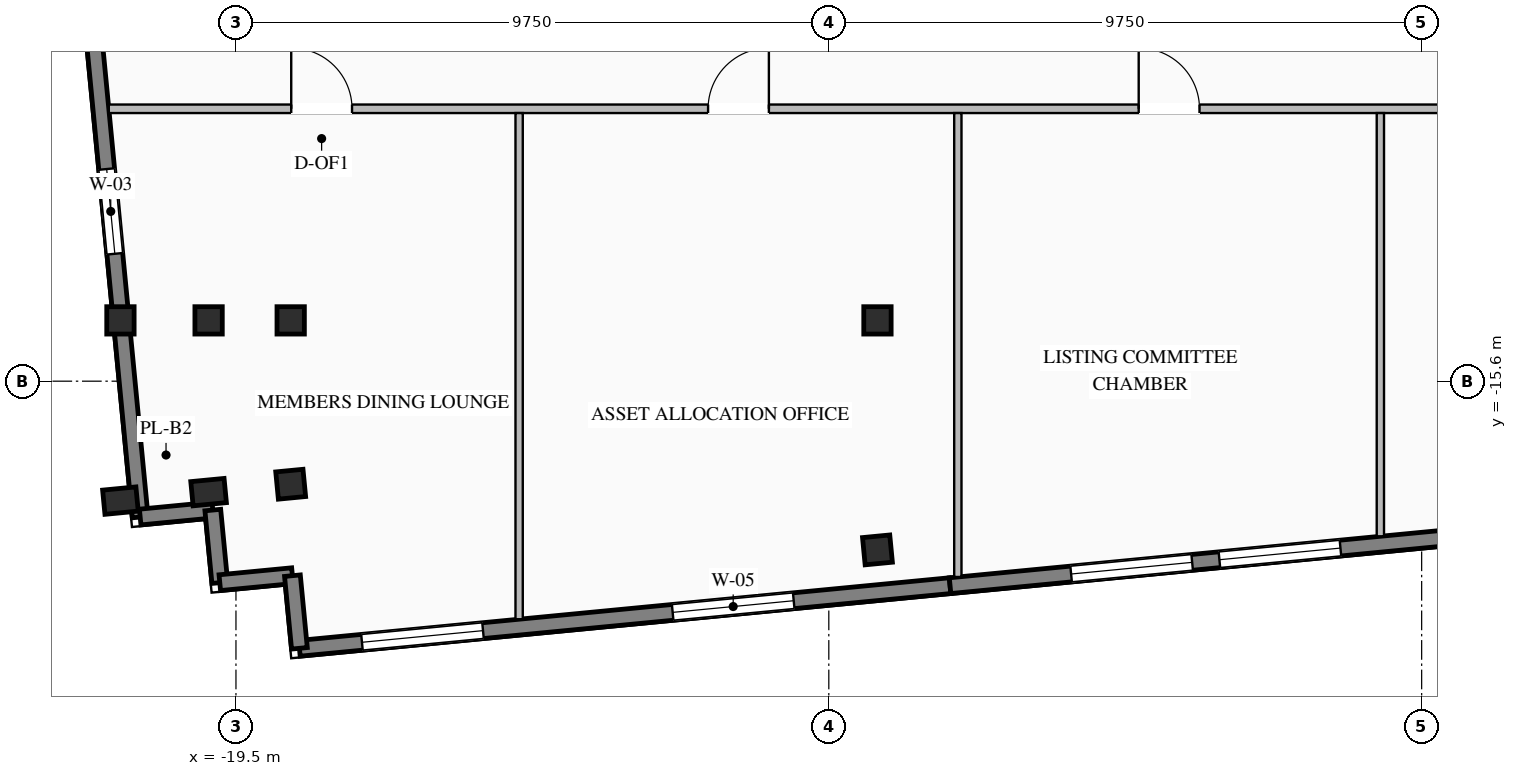
"""IFC4 building model, lengths in metres.
Left out: names, types, materials, properties, quantities, classifications, styles, units other than length and angle.
Written with IfcOpenShell. Run it as: python <this file> out.ifc"""

import sys

from ifc_helpers import new_model, si_unit, direction, frame, frame_2d, origin, origin_2d, place, context, subcontext, project, spatial, rectangle, i_section, extrude, element, fill, save


model = new_model("IFC4")
c1 = context("Model", 3, precision=1e-05, world=origin(), true_north=direction((0.0, 1.0)))
c2 = subcontext(c1, "Body", "Model", "MODEL_VIEW")
j1 = project(units=[si_unit("LENGTHUNIT", "METRE"), si_unit("PLANEANGLEUNIT", "RADIAN")], contexts=[c1])
p1 = place(None, origin())
s1 = spatial("IfcSite", under=j1, at=p1, CompositionType="ELEMENT")
p2 = place(p1, origin())
s2 = spatial("IfcBuilding", under=s1, at=p2, CompositionType="ELEMENT")
p3 = place(p2, frame((0.0, 0.0, 262.05)))
s3 = spatial("IfcBuildingStorey", under=s2, at=p3, CompositionType="ELEMENT", Elevation=262.05)
for number, where, z_axis, x_axis in (
    (1, (-21.4, -14.6, 0.0), (0.0, 0.0, 1.0), (1.0, 0.0, 0.0)),
    (2, (-19.95, -14.6, 0.0), (0.0, 0.0, 1.0), (1.0, 0.0, 0.0)),
    (3, (-18.6, -14.6, 0.0), (0.0, 0.0, 1.0), (1.0, 0.0, 0.0)),
    (4, (-8.95, -14.6, 0.0), (0.0, 0.0, 1.0), (1.0, 0.0, 0.0)),
    (5, (-18.6, -17.295, 0.0), (0.0, 0.0, 1.0), (0.995, 0.096, 0.0)),
    (6, (-8.95, -18.375, 0.0), (0.0, 0.0, 1.0), (0.995, 0.096, 0.0)),
):
    element("IfcColumn", number, at=place(p3, frame(where, z_axis=z_axis, x_axis=x_axis)), inside=s3, PredefinedType="COLUMN", context=c2, shape_type="SweptSolid", body=[
        extrude(i_section(OverallWidth=0.45, OverallDepth=0.45, WebThickness=0.022, FlangeThickness=0.032, at=origin_2d()), origin(), (0.0, 0.0, 1.0), 3.45),
    ])
for number, where, z_axis, x_axis in (
    (7, (-21.4, -17.564, 0.0), (0.0, 0.0, 1.0), (0.995, 0.096, 0.0)),
    (8, (-19.95, -17.425, 0.0), (0.0, 0.0, 1.0), (0.995, 0.096, 0.0)),
):
    element("IfcColumn", number, at=place(p3, frame(where, z_axis=z_axis, x_axis=x_axis)), inside=s3, PredefinedType="PILASTER", context=c2, shape_type="SweptSolid", body=[
        extrude(rectangle(XDim=0.55, YDim=0.4, at=origin_2d()), origin(), (0.0, 0.0, 1.0), 3.45),
    ])
p4 = place(p3, frame((-7.756, -18.963, 0.0), z_axis=(0.0, 0.0, 1.0), x_axis=(-0.995396745868, -0.095840066339, 0.0)))
e9 = element("IfcWall", 9, at=p4, inside=s3, PredefinedType="STANDARD", context=c2, shape_type="SweptSolid", body=[
    extrude(rectangle(XDim=10.75, YDim=0.26, at=frame_2d((5.375, 0.0))), origin(), (0.0, 0.0, 1.0), 3.25),
])
p5 = place(p4, frame((2.583, 0.0, 0.76)))
e10 = element("IfcOpeningElement", 10, at=p5, cuts=e9, PredefinedType="OPENING", context=c2, shape_type="SweptSolid", body=[
    extrude(rectangle(XDim=2.0, YDim=2.05, at=frame_2d((1.0, 1.025))), frame((0.0, 0.14, 0.0), z_axis=(0.0, -1.0, 0.0), x_axis=(1.0, 0.0, 0.0)), (0.0, 0.0, 1.0), 0.28),
])
p6 = place(p4, frame((7.717, 0.0, 0.76)))
e11 = element("IfcOpeningElement", 11, at=p6, cuts=e9, PredefinedType="OPENING", context=c2, shape_type="SweptSolid", body=[
    extrude(rectangle(XDim=2.0, YDim=2.05, at=frame_2d((1.0, 1.025))), frame((0.0, 0.14, 0.0), z_axis=(0.0, -1.0, 0.0), x_axis=(1.0, 0.0, 0.0)), (0.0, 0.0, 1.0), 0.28),
])
p7 = place(p3, frame((1.203, -18.101, 0.0), z_axis=(0.0, 0.0, 1.0), x_axis=(-0.995397043619, -0.095836973841, 0.0)))
e12 = element("IfcWall", 12, at=p7, inside=s3, PredefinedType="STANDARD", context=c2, shape_type="SweptSolid", body=[
    extrude(rectangle(XDim=9.0, YDim=0.26, at=frame_2d((4.5, 0.0))), origin(), (0.0, 0.0, 1.0), 3.25),
])
p8 = place(p7, frame((2.55, 0.0, 0.76)))
e13 = element("IfcOpeningElement", 13, at=p8, cuts=e12, PredefinedType="OPENING", context=c2, shape_type="SweptSolid", body=[
    extrude(rectangle(XDim=2.0, YDim=2.05, at=frame_2d((1.0, 1.025))), frame((0.0, 0.14, 0.0), z_axis=(0.0, -1.0, 0.0), x_axis=(1.0, 0.0, 0.0)), (0.0, 0.0, 1.0), 0.28),
])
p9 = place(p7, frame((5.0, 0.0, 0.76)))
e14 = element("IfcOpeningElement", 14, at=p9, cuts=e12, PredefinedType="OPENING", context=c2, shape_type="SweptSolid", body=[
    extrude(rectangle(XDim=2.0, YDim=2.05, at=frame_2d((1.0, 1.025))), frame((0.0, 0.14, 0.0), z_axis=(0.0, -1.0, 0.0), x_axis=(1.0, 0.0, 0.0)), (0.0, 0.0, 1.0), 0.28),
])
p10 = place(p3, frame((-21.075, -17.834, 0.0), z_axis=(0.0, 0.0, 1.0), x_axis=(-0.095852427869, 0.995395555582, 0.0)))
e15 = element("IfcWall", 15, at=p10, inside=s3, PredefinedType="STANDARD", context=c2, shape_type="SweptSolid", body=[
    extrude(rectangle(XDim=15.15, YDim=0.26, at=frame_2d((7.575, 0.0))), origin(), (0.0, 0.0, 1.0), 2.645),
])
p11 = place(p10, frame((4.35, 0.0, 0.535)))
e16 = element("IfcOpeningElement", 16, at=p11, cuts=e15, PredefinedType="OPENING", context=c2, shape_type="SweptSolid", body=[
    extrude(rectangle(XDim=1.4, YDim=1.95, at=frame_2d((0.7, 0.975))), frame((0.0, 0.14, 0.0), z_axis=(0.0, -1.0, 0.0), x_axis=(1.0, 0.0, 0.0)), (0.0, 0.0, 1.0), 0.28),
])
p12 = place(p10, frame((9.4, 0.0, 0.535)))
e17 = element("IfcOpeningElement", 17, at=p12, cuts=e15, PredefinedType="OPENING", context=c2, shape_type="SweptSolid", body=[
    extrude(rectangle(XDim=1.4, YDim=1.95, at=frame_2d((0.7, 0.975))), frame((0.0, 0.14, 0.0), z_axis=(0.0, -1.0, 0.0), x_axis=(1.0, 0.0, 0.0)), (0.0, 0.0, 1.0), 0.28),
])
p13 = place(p3, frame((-21.075, -17.834, 0.0), z_axis=(0.0, 0.0, 1.0), x_axis=(0.995397091755, 0.095836473879, 0.0)))
e18 = element("IfcWall", 18, at=p13, inside=s3, PredefinedType="STANDARD", context=c2, shape_type="SweptSolid", body=[
    extrude(rectangle(XDim=1.2, YDim=0.26, at=frame_2d((0.6, 0.0))), origin(), (0.0, 0.0, 1.0), 2.645),
])
for number, where, z_axis, x_axis in (
    (19, (-19.881, -17.719, 0.0), (0.0, 0.0, 1.0), (0.096, -0.995, 0.0)),
    (20, (-19.766, -18.914, 0.0), (0.0, 0.0, 1.0), (0.995, 0.096, 0.0)),
):
    element("IfcWall", number, at=place(p3, frame(where, z_axis=z_axis, x_axis=x_axis)), inside=s3, PredefinedType="STANDARD", context=c2, shape_type="SweptSolid", body=[
        extrude(rectangle(XDim=1.2, YDim=0.26, at=frame_2d((0.6, 0.0))), origin(), (0.0, 0.0, 1.0), 2.645),
    ])
p14 = place(p3, frame((-18.571, -18.799, 0.0), z_axis=(0.0, 0.0, 1.0), x_axis=(0.095836473879, -0.995397091755, 0.0)))
e21 = element("IfcWall", 21, at=p14, inside=s3, PredefinedType="STANDARD", context=c2, shape_type="SweptSolid", body=[
    extrude(rectangle(XDim=1.2, YDim=0.26, at=frame_2d((0.6, 0.0))), origin(), (0.0, 0.0, 1.0), 2.645),
])
p15 = place(p3, frame((-21.591, -11.12, 0.0), z_axis=(0.0, 0.0, 1.0), x_axis=(1.0, 0.0, 0.0)))
e22 = element("IfcWall", 22, at=p15, inside=s3, PredefinedType="STANDARD", context=c2, shape_type="SweptSolid", body=[
    extrude(rectangle(XDim=53.285, YDim=0.14, at=frame_2d((26.643, 0.0))), origin(), (0.0, 0.0, 1.0), 3.25),
])
p16 = place(p15, frame((28.081, 0.0, 0.0)))
e23 = element("IfcOpeningElement", 23, at=p16, cuts=e22, PredefinedType="OPENING", context=c2, shape_type="SweptSolid", body=[
    extrude(rectangle(XDim=0.92, YDim=2.08, at=frame_2d((0.46, 1.04))), frame((0.0, 0.08, 0.0), z_axis=(0.0, -1.0, 0.0), x_axis=(1.0, 0.0, 0.0)), (0.0, 0.0, 1.0), 0.16),
])
p17 = place(p15, frame((31.581, 0.0, 0.0)))
e24 = element("IfcOpeningElement", 24, at=p17, cuts=e22, PredefinedType="OPENING", context=c2, shape_type="SweptSolid", body=[
    extrude(rectangle(XDim=0.92, YDim=2.08, at=frame_2d((0.46, 1.04))), frame((0.0, 0.08, 0.0), z_axis=(0.0, -1.0, 0.0), x_axis=(1.0, 0.0, 0.0)), (0.0, 0.0, 1.0), 0.16),
])
p18 = place(p15, frame((34.431, 0.0, 0.0)))
e25 = element("IfcOpeningElement", 25, at=p18, cuts=e22, PredefinedType="OPENING", context=c2, shape_type="SweptSolid", body=[
    extrude(rectangle(XDim=0.92, YDim=2.08, at=frame_2d((0.46, 1.04))), frame((0.0, 0.08, 0.0), z_axis=(0.0, -1.0, 0.0), x_axis=(1.0, 0.0, 0.0)), (0.0, 0.0, 1.0), 0.16),
])
p19 = place(p15, frame((3.0, 0.0, 0.0)))
e26 = element("IfcOpeningElement", 26, at=p19, cuts=e22, PredefinedType="OPENING", context=c2, shape_type="SweptSolid", body=[
    extrude(rectangle(XDim=1.0, YDim=2.08, at=frame_2d((0.5, 1.04))), frame((0.0, 0.08, 0.0), z_axis=(0.0, -1.0, 0.0), x_axis=(1.0, 0.0, 0.0)), (0.0, 0.0, 1.0), 0.16),
])
p20 = place(p15, frame((9.856, 0.0, 0.0)))
e27 = element("IfcOpeningElement", 27, at=p20, cuts=e22, PredefinedType="OPENING", context=c2, shape_type="SweptSolid", body=[
    extrude(rectangle(XDim=1.0, YDim=2.08, at=frame_2d((0.5, 1.04))), frame((0.0, 0.08, 0.0), z_axis=(0.0, -1.0, 0.0), x_axis=(1.0, 0.0, 0.0)), (0.0, 0.0, 1.0), 0.16),
])
p21 = place(p15, frame((16.938, 0.0, 0.0)))
e28 = element("IfcOpeningElement", 28, at=p21, cuts=e22, PredefinedType="OPENING", context=c2, shape_type="SweptSolid", body=[
    extrude(rectangle(XDim=1.0, YDim=2.08, at=frame_2d((0.5, 1.04))), frame((0.0, 0.08, 0.0), z_axis=(0.0, -1.0, 0.0), x_axis=(1.0, 0.0, 0.0)), (0.0, 0.0, 1.0), 0.16),
])
p22 = place(p15, frame((23.352, 0.0, 0.0)))
e29 = element("IfcOpeningElement", 29, at=p22, cuts=e22, PredefinedType="OPENING", context=c2, shape_type="SweptSolid", body=[
    extrude(rectangle(XDim=1.0, YDim=2.08, at=frame_2d((0.5, 1.04))), frame((0.0, 0.08, 0.0), z_axis=(0.0, -1.0, 0.0), x_axis=(1.0, 0.0, 0.0)), (0.0, 0.0, 1.0), 0.16),
])
p23 = place(p15, frame((37.663, 0.0, 0.0)))
e30 = element("IfcOpeningElement", 30, at=p23, cuts=e22, PredefinedType="OPENING", context=c2, shape_type="SweptSolid", body=[
    extrude(rectangle(XDim=1.0, YDim=2.08, at=frame_2d((0.5, 1.04))), frame((0.0, 0.08, 0.0), z_axis=(0.0, -1.0, 0.0), x_axis=(1.0, 0.0, 0.0)), (0.0, 0.0, 1.0), 0.16),
])
p24 = place(p15, frame((42.179, 0.0, 0.0)))
e31 = element("IfcOpeningElement", 31, at=p24, cuts=e22, PredefinedType="OPENING", context=c2, shape_type="SweptSolid", body=[
    extrude(rectangle(XDim=1.0, YDim=2.08, at=frame_2d((0.5, 1.04))), frame((0.0, 0.08, 0.0), z_axis=(0.0, -1.0, 0.0), x_axis=(1.0, 0.0, 0.0)), (0.0, 0.0, 1.0), 0.16),
])
p25 = place(p15, frame((46.783, 0.0, 0.0)))
e32 = element("IfcOpeningElement", 32, at=p25, cuts=e22, PredefinedType="OPENING", context=c2, shape_type="SweptSolid", body=[
    extrude(rectangle(XDim=1.0, YDim=2.08, at=frame_2d((0.5, 1.04))), frame((0.0, 0.08, 0.0), z_axis=(0.0, -1.0, 0.0), x_axis=(1.0, 0.0, 0.0)), (0.0, 0.0, 1.0), 0.16),
])
p26 = place(p15, frame((50.787, 0.0, 0.0)))
e33 = element("IfcOpeningElement", 33, at=p26, cuts=e22, PredefinedType="OPENING", context=c2, shape_type="SweptSolid", body=[
    extrude(rectangle(XDim=1.0, YDim=2.08, at=frame_2d((0.5, 1.04))), frame((0.0, 0.08, 0.0), z_axis=(0.0, -1.0, 0.0), x_axis=(1.0, 0.0, 0.0)), (0.0, 0.0, 1.0), 0.16),
])
p27 = place(p3, frame((-14.843, -19.515, 0.0), z_axis=(0.0, 0.0, 1.0), x_axis=(0.0, 1.0, 0.0)))
e34 = element("IfcWall", 34, at=p27, inside=s3, PredefinedType="STANDARD", context=c2, shape_type="SweptSolid", body=[
    extrude(rectangle(XDim=8.325, YDim=0.12, at=frame_2d((4.163, 0.0))), origin(), (0.0, 0.0, 1.0), 3.25),
])
p28 = place(p3, frame((-7.628, -18.82, 0.0), z_axis=(0.0, 0.0, 1.0), x_axis=(0.0, 1.0, 0.0)))
e35 = element("IfcWall", 35, at=p28, inside=s3, PredefinedType="STANDARD", context=c2, shape_type="SweptSolid", body=[
    extrude(rectangle(XDim=7.63, YDim=0.12, at=frame_2d((3.815, 0.0))), origin(), (0.0, 0.0, 1.0), 3.25),
])
p29 = place(p3, frame((-0.679, -18.151, 0.0), z_axis=(0.0, 0.0, 1.0), x_axis=(0.0, 1.0, 0.0)))
e36 = element("IfcWall", 36, at=p29, inside=s3, PredefinedType="STANDARD", context=c2, shape_type="SweptSolid", body=[
    extrude(rectangle(XDim=6.961, YDim=0.12, at=frame_2d((3.48, 0.0))), origin(), (0.0, 0.0, 1.0), 3.25),
])
p30 = place(p5, origin())
e37 = element("IfcWindow", 37, at=p30, inside=s3, PartitioningType="DOUBLE_PANEL_VERTICAL", PredefinedType="WINDOW", context=c2, shape_type="SweptSolid", body=[
    extrude(rectangle(XDim=2.0, YDim=2.05, at=frame_2d((1.0, 1.025))), frame((0.0, 0.03, 0.0), z_axis=(0.0, -1.0, 0.0), x_axis=(1.0, 0.0, 0.0)), (0.0, 0.0, 1.0), 0.06),
])
fill(e10, e37)
p31 = place(p6, origin())
e38 = element("IfcWindow", 38, at=p31, inside=s3, PartitioningType="DOUBLE_PANEL_VERTICAL", PredefinedType="WINDOW", context=c2, shape_type="SweptSolid", body=[
    extrude(rectangle(XDim=2.0, YDim=2.05, at=frame_2d((1.0, 1.025))), frame((0.0, 0.03, 0.0), z_axis=(0.0, -1.0, 0.0), x_axis=(1.0, 0.0, 0.0)), (0.0, 0.0, 1.0), 0.06),
])
fill(e11, e38)
p32 = place(p8, origin())
e39 = element("IfcWindow", 39, at=p32, inside=s3, PartitioningType="DOUBLE_PANEL_VERTICAL", PredefinedType="WINDOW", context=c2, shape_type="SweptSolid", body=[
    extrude(rectangle(XDim=2.0, YDim=2.05, at=frame_2d((1.0, 1.025))), frame((0.0, 0.03, 0.0), z_axis=(0.0, -1.0, 0.0), x_axis=(1.0, 0.0, 0.0)), (0.0, 0.0, 1.0), 0.06),
])
fill(e13, e39)
p33 = place(p9, origin())
e40 = element("IfcWindow", 40, at=p33, inside=s3, PartitioningType="DOUBLE_PANEL_VERTICAL", PredefinedType="WINDOW", context=c2, shape_type="SweptSolid", body=[
    extrude(rectangle(XDim=2.0, YDim=2.05, at=frame_2d((1.0, 1.025))), frame((0.0, 0.03, 0.0), z_axis=(0.0, -1.0, 0.0), x_axis=(1.0, 0.0, 0.0)), (0.0, 0.0, 1.0), 0.06),
])
fill(e14, e40)
p34 = place(p11, origin())
e41 = element("IfcWindow", 41, at=p34, inside=s3, PartitioningType="SINGLE_PANEL", PredefinedType="WINDOW", context=c2, shape_type="SweptSolid", body=[
    extrude(rectangle(XDim=1.4, YDim=1.95, at=frame_2d((0.7, 0.975))), frame((0.0, 0.03, 0.0), z_axis=(0.0, -1.0, 0.0), x_axis=(1.0, 0.0, 0.0)), (0.0, 0.0, 1.0), 0.06),
])
fill(e16, e41)
p35 = place(p19, origin())
e42 = element("IfcDoor", 42, at=p35, inside=s3, OperationType="SINGLE_SWING_LEFT", PredefinedType="DOOR", context=c2, shape_type="SweptSolid", body=[
    extrude(rectangle(XDim=1.0, YDim=2.08, at=frame_2d((0.5, 1.04))), frame((0.0, 0.025, 0.0), z_axis=(0.0, -1.0, 0.0), x_axis=(1.0, 0.0, 0.0)), (0.0, 0.0, 1.0), 0.05),
])
fill(e26, e42)
p36 = place(p20, origin())
e43 = element("IfcDoor", 43, at=p36, inside=s3, OperationType="SINGLE_SWING_RIGHT", PredefinedType="DOOR", context=c2, shape_type="SweptSolid", body=[
    extrude(rectangle(XDim=1.0, YDim=2.08, at=frame_2d((0.5, 1.04))), frame((0.0, 0.025, 0.0), z_axis=(0.0, -1.0, 0.0), x_axis=(1.0, 0.0, 0.0)), (0.0, 0.0, 1.0), 0.05),
])
fill(e27, e43)
p37 = place(p21, origin())
e44 = element("IfcDoor", 44, at=p37, inside=s3, OperationType="SINGLE_SWING_LEFT", PredefinedType="DOOR", context=c2, shape_type="SweptSolid", body=[
    extrude(rectangle(XDim=1.0, YDim=2.08, at=frame_2d((0.5, 1.04))), frame((0.0, 0.025, 0.0), z_axis=(0.0, -1.0, 0.0), x_axis=(1.0, 0.0, 0.0)), (0.0, 0.0, 1.0), 0.05),
])
fill(e28, e44)
save(model, sys.argv[1])
